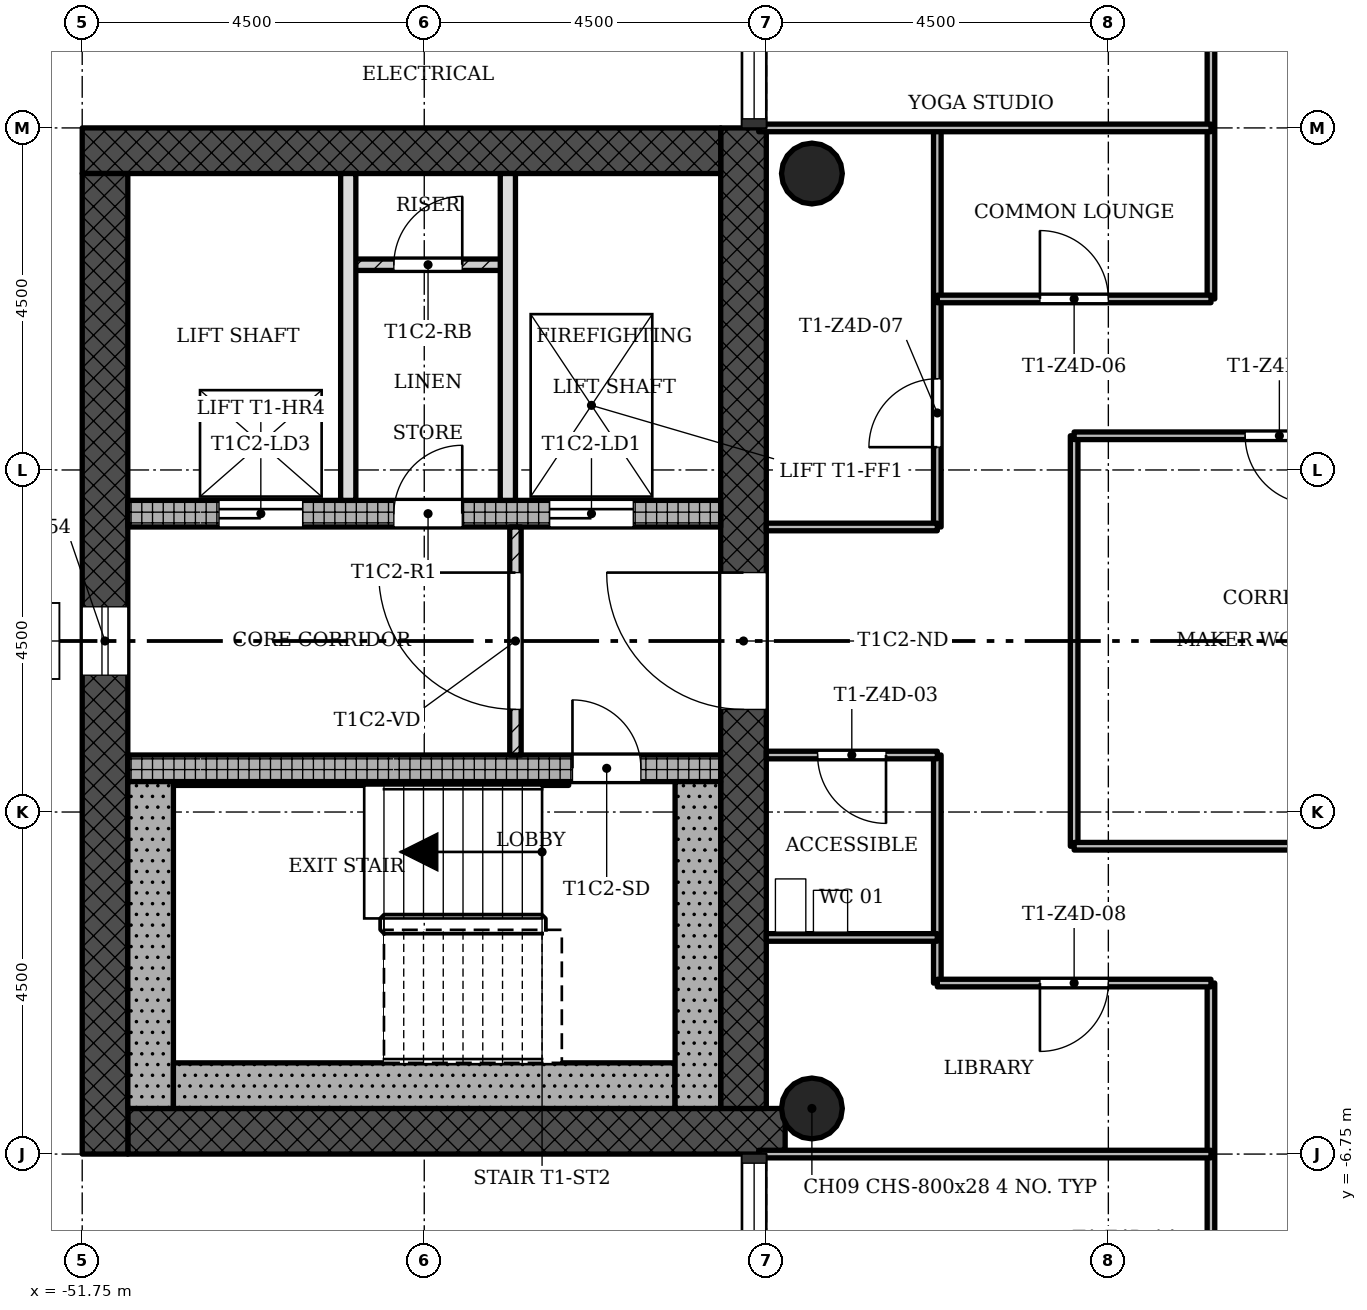
"""IFC4 building model, lengths in metres.
Left out: names, types, materials, properties, quantities, classifications, styles, units other than length and angle.
Written with IfcOpenShell. Run it as: python <this file> out.ifc"""

import sys

from ifc_helpers import new_model, si_unit, direction, frame, frame_2d, origin, origin_2d, place, context, subcontext, project, spatial, rectangle, hollow_circle, extrude, element, fill, save


model = new_model("IFC4")
c1 = context("Model", 3, precision=1e-05, world=origin(), true_north=direction((0.0, 1.0)))
c2 = subcontext(c1, "Body", "Model", "MODEL_VIEW")
j1 = project(units=[si_unit("LENGTHUNIT", "METRE"), si_unit("PLANEANGLEUNIT", "RADIAN")], contexts=[c1])
p1 = place(None, origin())
s1 = spatial("IfcSite", under=j1, at=p1, CompositionType="ELEMENT")
p2 = place(p1, origin())
s2 = spatial("IfcBuilding", under=s1, at=p2, CompositionType="ELEMENT")
p3 = place(p2, frame((0.0, 0.0, 196.0)))
s3 = spatial("IfcBuildingStorey", under=s2, at=p3, CompositionType="ELEMENT", Elevation=196.0)
p4 = place(p3, frame((-51.15, -6.45, 0.0), z_axis=(0.0, 0.0, 1.0), x_axis=(1.0, 0.0, 0.0)))
e1 = element("IfcWall", 1, at=p4, inside=s3, PredefinedType="SHEAR", context=c2, shape_type="SweptSolid", body=[
    extrude(rectangle(XDim=8.648, YDim=0.6, at=frame_2d((4.324, 0.0))), origin(), (0.0, 0.0, 1.0), 3.4),
])
p5 = place(p3, frame((-43.05, -6.15, 0.0), z_axis=(0.0, 0.0, 1.0), x_axis=(0.0, 1.0, 0.0)))
e2 = element("IfcWall", 2, at=p5, inside=s3, PredefinedType="SHEAR", context=c2, shape_type="SweptSolid", body=[
    extrude(rectangle(XDim=12.9, YDim=0.6, at=frame_2d((6.45, 0.0))), origin(), (0.0, 0.0, 1.0), 3.4),
])
p6 = place(p5, frame((5.25, 0.0, 0.0)))
e3 = element("IfcOpeningElement", 3, at=p6, cuts=e2, PredefinedType="OPENING", context=c2, shape_type="SweptSolid", body=[
    extrude(rectangle(XDim=1.8, YDim=2.1, at=frame_2d((0.9, 1.05))), frame((0.0, 0.31, 0.0), z_axis=(0.0, -1.0, 0.0), x_axis=(1.0, 0.0, 0.0)), (0.0, 0.0, 1.0), 0.62),
])
p7 = place(p3, frame((-43.35, 6.45, 0.0), z_axis=(0.0, 0.0, 1.0), x_axis=(-1.0, 0.0, 0.0)))
e4 = element("IfcWall", 4, at=p7, inside=s3, PredefinedType="SHEAR", context=c2, shape_type="SweptSolid", body=[
    extrude(rectangle(XDim=8.4, YDim=0.6, at=frame_2d((4.2, 0.0))), origin(), (0.0, 0.0, 1.0), 3.4),
])
p8 = place(p3, frame((-51.45, 6.15, 0.0), z_axis=(0.0, 0.0, 1.0), x_axis=(0.0, -1.0, 0.0)))
e5 = element("IfcWall", 5, at=p8, inside=s3, PredefinedType="SHEAR", context=c2, shape_type="SweptSolid", body=[
    extrude(rectangle(XDim=12.9, YDim=0.6, at=frame_2d((6.45, 0.0))), origin(), (0.0, 0.0, 1.0), 3.4),
])
p9 = place(p8, frame((5.7, 0.0, 0.45)))
e6 = element("IfcOpeningElement", 6, at=p9, cuts=e5, PredefinedType="OPENING", context=c2, shape_type="SweptSolid", body=[
    extrude(rectangle(XDim=0.9, YDim=2.4, at=frame_2d((0.45, 1.2))), frame((0.0, 0.31, 0.0), z_axis=(0.0, -1.0, 0.0), x_axis=(1.0, 0.0, 0.0)), (0.0, 0.0, 1.0), 0.62),
])
p10 = place(p3, frame((-51.15, -1.675, 0.0), z_axis=(0.0, 0.0, 1.0), x_axis=(1.0, 0.0, 0.0)))
e7 = element("IfcWall", 7, at=p10, inside=s3, PredefinedType="SHEAR", context=c2, shape_type="SweptSolid", body=[
    extrude(rectangle(XDim=7.8, YDim=0.35, at=frame_2d((3.9, 0.0))), origin(), (0.0, 0.0, 1.0), 3.4),
])
p11 = place(p10, frame((5.85, 0.0, 0.0)))
e8 = element("IfcOpeningElement", 8, at=p11, cuts=e7, PredefinedType="OPENING", context=c2, shape_type="SweptSolid", body=[
    extrude(rectangle(XDim=0.9, YDim=2.1, at=frame_2d((0.45, 1.05))), frame((0.0, 0.185, 0.0), z_axis=(0.0, -1.0, 0.0), x_axis=(1.0, 0.0, 0.0)), (0.0, 0.0, 1.0), 0.37),
])
p12 = place(p3, frame((-51.15, 1.675, 0.0), z_axis=(0.0, 0.0, 1.0), x_axis=(1.0, 0.0, 0.0)))
e9 = element("IfcWall", 9, at=p12, inside=s3, PredefinedType="SHEAR", context=c2, shape_type="SweptSolid", body=[
    extrude(rectangle(XDim=7.8, YDim=0.35, at=frame_2d((3.9, 0.0))), origin(), (0.0, 0.0, 1.0), 3.4),
])
p13 = place(p12, frame((5.55, 0.0, 0.0)))
e10 = element("IfcOpeningElement", 10, at=p13, cuts=e9, PredefinedType="OPENING", context=c2, shape_type="SweptSolid", body=[
    extrude(rectangle(XDim=1.1, YDim=2.1, at=frame_2d((0.55, 1.05))), frame((0.0, 0.185, 0.0), z_axis=(0.0, -1.0, 0.0), x_axis=(1.0, 0.0, 0.0)), (0.0, 0.0, 1.0), 0.37),
])
p14 = place(p12, frame((1.2, 0.0, 0.0)))
e11 = element("IfcOpeningElement", 11, at=p14, cuts=e9, PredefinedType="OPENING", context=c2, shape_type="SweptSolid", body=[
    extrude(rectangle(XDim=1.1, YDim=2.1, at=frame_2d((0.55, 1.05))), frame((0.0, 0.185, 0.0), z_axis=(0.0, -1.0, 0.0), x_axis=(1.0, 0.0, 0.0)), (0.0, 0.0, 1.0), 0.37),
])
p15 = place(p12, frame((3.5, 0.0, 0.0)))
e12 = element("IfcOpeningElement", 12, at=p15, cuts=e9, PredefinedType="OPENING", context=c2, shape_type="SweptSolid", body=[
    extrude(rectangle(XDim=0.9, YDim=2.1, at=frame_2d((0.45, 1.05))), frame((0.0, 0.185, 0.0), z_axis=(0.0, -1.0, 0.0), x_axis=(1.0, 0.0, 0.0)), (0.0, 0.0, 1.0), 0.37),
])
for number, where, z_axis, x_axis in (
    (13, (-42.15, -6.15, 0.0), (0.0, 0.0, 1.0), (1.0, 0.0, 0.0)),
    (14, (-42.15, 6.15, 0.0), (0.0, 0.0, 1.0), (1.0, 0.0, 0.0)),
):
    element("IfcColumn", number, at=place(p3, frame(where, z_axis=z_axis, x_axis=x_axis)), inside=s3, PredefinedType="COLUMN", context=c2, shape_type="SweptSolid", body=[
        extrude(hollow_circle(Radius=0.4, WallThickness=0.028, at=origin_2d()), origin(), (0.0, 0.0, 1.0), 3.4),
    ])
p16 = place(p3, frame((-46.05, 1.5, 0.0), z_axis=(0.0, 0.0, 1.0), x_axis=(0.0, -1.0, 0.0)))
e15 = element("IfcWall", 15, at=p16, inside=s3, PredefinedType="PARTITIONING", context=c2, shape_type="SweptSolid", body=[
    extrude(rectangle(XDim=3.0, YDim=0.15, at=frame_2d((1.5, 0.0))), origin(), (0.0, 0.0, 1.0), 3.0),
])
p17 = place(p16, frame((0.6, 0.0, 0.0)))
e16 = element("IfcOpeningElement", 16, at=p17, cuts=e15, PredefinedType="OPENING", context=c2, shape_type="SweptSolid", body=[
    extrude(rectangle(XDim=1.8, YDim=2.1, at=frame_2d((0.9, 1.05))), frame((0.0, 0.085, 0.0), z_axis=(0.0, -1.0, 0.0), x_axis=(1.0, 0.0, 0.0)), (0.0, 0.0, 1.0), 0.17),
])
for number, where, z_axis, x_axis in (
    (17, (-48.25, 6.15, 0.0), (0.0, 0.0, 1.0), (0.0, -1.0, 0.0)),
    (18, (-46.15, 6.15, 0.0), (0.0, 0.0, 1.0), (0.0, -1.0, 0.0)),
):
    element("IfcWall", number, at=place(p3, frame(where, z_axis=z_axis, x_axis=x_axis)), inside=s3, PredefinedType="SOLIDWALL", context=c2, shape_type="SweptSolid", body=[
        extrude(rectangle(XDim=4.3, YDim=0.2, at=frame_2d((2.15, 0.0))), origin(), (0.0, 0.0, 1.0), 3.0),
    ])
p18 = place(p3, frame((-46.15, 4.95, 0.0), z_axis=(0.0, 0.0, 1.0), x_axis=(-1.0, 0.0, 0.0)))
e19 = element("IfcWall", 19, at=p18, inside=s3, PredefinedType="PARTITIONING", context=c2, shape_type="SweptSolid", body=[
    extrude(rectangle(XDim=2.1, YDim=0.15, at=frame_2d((1.05, 0.0))), origin(), (0.0, 0.0, 1.0), 3.0),
])
p19 = place(p18, frame((0.6, 0.0, 0.0)))
e20 = element("IfcOpeningElement", 20, at=p19, cuts=e19, PredefinedType="OPENING", context=c2, shape_type="SweptSolid", body=[
    extrude(rectangle(XDim=0.9, YDim=2.1, at=frame_2d((0.45, 1.05))), frame((0.0, 0.085, 0.0), z_axis=(0.0, -1.0, 0.0), x_axis=(1.0, 0.0, 0.0)), (0.0, 0.0, 1.0), 0.17),
])
p20 = place(p3, frame((-40.5, -4.5, 0.0), z_axis=(0.0, 0.0, 1.0), x_axis=(0.0, 1.0, 0.0)))
e21 = element("IfcWall", 21, at=p20, inside=s3, PredefinedType="PARTITIONING", context=c2, shape_type="SweptSolid", body=[
    extrude(rectangle(XDim=3.0, YDim=0.1, at=frame_2d((1.5, 0.0))), origin(), (0.0, 0.0, 1.0), 3.0),
])
p21 = place(p3, frame((-40.5, 1.5, 0.0), z_axis=(0.0, 0.0, 1.0), x_axis=(0.0, 1.0, 0.0)))
e22 = element("IfcWall", 22, at=p21, inside=s3, PredefinedType="PARTITIONING", context=c2, shape_type="SweptSolid", body=[
    extrude(rectangle(XDim=5.25, YDim=0.1, at=frame_2d((2.625, 0.0))), origin(), (0.0, 0.0, 1.0), 3.0),
])
p22 = place(p21, frame((1.05, 0.0, 0.0)))
e23 = element("IfcOpeningElement", 23, at=p22, cuts=e22, PredefinedType="OPENING", context=c2, shape_type="SweptSolid", body=[
    extrude(rectangle(XDim=0.9, YDim=2.1, at=frame_2d((0.45, 1.05))), frame((0.0, 0.06, 0.0), z_axis=(0.0, -1.0, 0.0), x_axis=(1.0, 0.0, 0.0)), (0.0, 0.0, 1.0), 0.12),
])
p23 = place(p3, frame((-38.7, -2.7, 0.0), z_axis=(0.0, 0.0, 1.0), x_axis=(0.0, 1.0, 0.0)))
e24 = element("IfcWall", 24, at=p23, inside=s3, PredefinedType="PARTITIONING", context=c2, shape_type="SweptSolid", body=[
    extrude(rectangle(XDim=5.4, YDim=0.1, at=frame_2d((2.7, 0.0))), origin(), (0.0, 0.0, 1.0), 3.0),
])
p24 = place(p3, frame((-36.9, -11.25, 0.0), z_axis=(0.0, 0.0, 1.0), x_axis=(0.0, 1.0, 0.0)))
e25 = element("IfcWall", 25, at=p24, inside=s3, PredefinedType="PARTITIONING", context=c2, shape_type="SweptSolid", body=[
    extrude(rectangle(XDim=6.75, YDim=0.1, at=frame_2d((3.375, 0.0))), origin(), (0.0, 0.0, 1.0), 3.0),
])
p25 = place(p24, frame((1.8, 0.0, 0.0)))
e26 = element("IfcOpeningElement", 26, at=p25, cuts=e25, PredefinedType="OPENING", context=c2, shape_type="SweptSolid", body=[
    extrude(rectangle(XDim=0.9, YDim=2.1, at=frame_2d((0.45, 1.05))), frame((0.0, 0.06, 0.0), z_axis=(0.0, -1.0, 0.0), x_axis=(1.0, 0.0, 0.0)), (0.0, 0.0, 1.0), 0.12),
])
p26 = place(p3, frame((-36.9, 4.5, 0.0), z_axis=(0.0, 0.0, 1.0), x_axis=(0.0, 1.0, 0.0)))
e27 = element("IfcWall", 27, at=p26, inside=s3, PredefinedType="PARTITIONING", context=c2, shape_type="SweptSolid", body=[
    extrude(rectangle(XDim=4.05, YDim=0.1, at=frame_2d((2.025, 0.0))), origin(), (0.0, 0.0, 1.0), 3.0),
])
p27 = place(p3, frame((-42.85, -6.75, 0.0), z_axis=(0.0, 0.0, 1.0), x_axis=(1.0, 0.0, 0.0)))
e28 = element("IfcWall", 28, at=p27, inside=s3, PredefinedType="PARTITIONING", context=c2, shape_type="SweptSolid", body=[
    extrude(rectangle(XDim=5.95, YDim=0.1, at=frame_2d((2.975, 0.0))), origin(), (0.0, 0.0, 1.0), 3.0),
])
p28 = place(p3, frame((-40.5, -4.5, 0.0), z_axis=(0.0, 0.0, 1.0), x_axis=(1.0, 0.0, 0.0)))
e29 = element("IfcWall", 29, at=p28, inside=s3, PredefinedType="PARTITIONING", context=c2, shape_type="SweptSolid", body=[
    extrude(rectangle(XDim=3.6, YDim=0.1, at=frame_2d((1.8, 0.0))), origin(), (0.0, 0.0, 1.0), 3.0),
])
p29 = place(p28, frame((1.35, 0.0, 0.0)))
e30 = element("IfcOpeningElement", 30, at=p29, cuts=e29, PredefinedType="OPENING", context=c2, shape_type="SweptSolid", body=[
    extrude(rectangle(XDim=0.9, YDim=2.1, at=frame_2d((0.45, 1.05))), frame((0.0, 0.06, 0.0), z_axis=(0.0, -1.0, 0.0), x_axis=(1.0, 0.0, 0.0)), (0.0, 0.0, 1.0), 0.12),
])
p30 = place(p3, frame((-42.75, -3.9, 0.0), z_axis=(0.0, 0.0, 1.0), x_axis=(1.0, 0.0, 0.0)))
e31 = element("IfcWall", 31, at=p30, inside=s3, PredefinedType="PARTITIONING", context=c2, shape_type="SweptSolid", body=[
    extrude(rectangle(XDim=2.25, YDim=0.1, at=frame_2d((1.125, 0.0))), origin(), (0.0, 0.0, 1.0), 3.0),
])
p31 = place(p3, frame((-38.7, -2.7, 0.0), z_axis=(0.0, 0.0, 1.0), x_axis=(1.0, 0.0, 0.0)))
e32 = element("IfcWall", 32, at=p31, inside=s3, PredefinedType="PARTITIONING", context=c2, shape_type="SweptSolid", body=[
    extrude(rectangle(XDim=5.4, YDim=0.1, at=frame_2d((2.7, 0.0))), origin(), (0.0, 0.0, 1.0), 3.0),
])
p32 = place(p3, frame((-42.75, -1.5, 0.0), z_axis=(0.0, 0.0, 1.0), x_axis=(1.0, 0.0, 0.0)))
e33 = element("IfcWall", 33, at=p32, inside=s3, PredefinedType="PARTITIONING", context=c2, shape_type="SweptSolid", body=[
    extrude(rectangle(XDim=2.25, YDim=0.1, at=frame_2d((1.125, 0.0))), origin(), (0.0, 0.0, 1.0), 3.0),
])
p33 = place(p32, frame((0.675, 0.0, 0.0)))
e34 = element("IfcOpeningElement", 34, at=p33, cuts=e33, PredefinedType="OPENING", context=c2, shape_type="SweptSolid", body=[
    extrude(rectangle(XDim=0.9, YDim=2.1, at=frame_2d((0.45, 1.05))), frame((0.0, 0.06, 0.0), z_axis=(0.0, -1.0, 0.0), x_axis=(1.0, 0.0, 0.0)), (0.0, 0.0, 1.0), 0.12),
])
p34 = place(p3, frame((-42.75, 1.5, 0.0), z_axis=(0.0, 0.0, 1.0), x_axis=(1.0, 0.0, 0.0)))
e35 = element("IfcWall", 35, at=p34, inside=s3, PredefinedType="PARTITIONING", context=c2, shape_type="SweptSolid", body=[
    extrude(rectangle(XDim=2.25, YDim=0.1, at=frame_2d((1.125, 0.0))), origin(), (0.0, 0.0, 1.0), 3.0),
])
p35 = place(p3, frame((-38.7, 2.7, 0.0), z_axis=(0.0, 0.0, 1.0), x_axis=(1.0, 0.0, 0.0)))
e36 = element("IfcWall", 36, at=p35, inside=s3, PredefinedType="PARTITIONING", context=c2, shape_type="SweptSolid", body=[
    extrude(rectangle(XDim=5.4, YDim=0.1, at=frame_2d((2.7, 0.0))), origin(), (0.0, 0.0, 1.0), 3.0),
])
p36 = place(p35, frame((2.25, 0.0, 0.0)))
e37 = element("IfcOpeningElement", 37, at=p36, cuts=e36, PredefinedType="OPENING", context=c2, shape_type="SweptSolid", body=[
    extrude(rectangle(XDim=0.9, YDim=2.1, at=frame_2d((0.45, 1.05))), frame((0.0, 0.06, 0.0), z_axis=(0.0, -1.0, 0.0), x_axis=(1.0, 0.0, 0.0)), (0.0, 0.0, 1.0), 0.12),
])
p37 = place(p3, frame((-40.5, 4.5, 0.0), z_axis=(0.0, 0.0, 1.0), x_axis=(1.0, 0.0, 0.0)))
e38 = element("IfcWall", 38, at=p37, inside=s3, PredefinedType="PARTITIONING", context=c2, shape_type="SweptSolid", body=[
    extrude(rectangle(XDim=3.6, YDim=0.1, at=frame_2d((1.8, 0.0))), origin(), (0.0, 0.0, 1.0), 3.0),
])
p38 = place(p37, frame((1.35, 0.0, 0.0)))
e39 = element("IfcOpeningElement", 39, at=p38, cuts=e38, PredefinedType="OPENING", context=c2, shape_type="SweptSolid", body=[
    extrude(rectangle(XDim=0.9, YDim=2.1, at=frame_2d((0.45, 1.05))), frame((0.0, 0.06, 0.0), z_axis=(0.0, -1.0, 0.0), x_axis=(1.0, 0.0, 0.0)), (0.0, 0.0, 1.0), 0.12),
])
p39 = place(p3, frame((-42.85, 6.75, 0.0), z_axis=(0.0, 0.0, 1.0), x_axis=(1.0, 0.0, 0.0)))
e40 = element("IfcWall", 40, at=p39, inside=s3, PredefinedType="PARTITIONING", context=c2, shape_type="SweptSolid", body=[
    extrude(rectangle(XDim=5.95, YDim=0.1, at=frame_2d((2.975, 0.0))), origin(), (0.0, 0.0, 1.0), 3.0),
])
p40 = place(p3, frame((-50.85, -1.85, 0.0), z_axis=(0.0, 0.0, 1.0), x_axis=(0.0, -1.0, 0.0)))
e41 = element("IfcWall", 41, at=p40, inside=s3, PredefinedType="SHEAR", context=c2, shape_type="SweptSolid", body=[
    extrude(rectangle(XDim=4.3, YDim=0.6, at=frame_2d((2.15, 0.0))), origin(), (0.0, 0.0, 1.0), 3.4),
])
p41 = place(p3, frame((-43.95, -5.85, 0.0), z_axis=(0.0, 0.0, 1.0), x_axis=(-1.0, 0.0, 0.0)))
e42 = element("IfcWall", 42, at=p41, inside=s3, PredefinedType="SHEAR", context=c2, shape_type="SweptSolid", body=[
    extrude(rectangle(XDim=6.6, YDim=0.6, at=frame_2d((3.3, 0.0))), origin(), (0.0, 0.0, 1.0), 3.4),
])
p42 = place(p3, frame((-43.65, -1.85, 0.0), z_axis=(0.0, 0.0, 1.0), x_axis=(0.0, -1.0, 0.0)))
e43 = element("IfcWall", 43, at=p42, inside=s3, PredefinedType="SHEAR", context=c2, shape_type="SweptSolid", body=[
    extrude(rectangle(XDim=4.3, YDim=0.6, at=frame_2d((2.15, 0.0))), origin(), (0.0, 0.0, 1.0), 3.4),
])
p43 = place(p3, frame((-45.35, -1.875, 0.0), z_axis=(0.0, 0.0, 1.0), x_axis=(-1.0, 0.0, 0.0)))
e44 = element("IfcWall", 44, at=p43, inside=s3, PredefinedType="SHEAR", context=c2, shape_type="SweptSolid", body=[
    extrude(rectangle(XDim=5.2, YDim=0.05, at=frame_2d((2.6, 0.0))), origin(), (0.0, 0.0, 1.0), 3.4),
])
p44 = place(p9, origin())
e45 = element("IfcWindow", 45, at=p44, inside=s3, PartitioningType="SINGLE_PANEL", PredefinedType="WINDOW", context=c2, shape_type="SweptSolid", body=[
    extrude(rectangle(XDim=0.9, YDim=2.4, at=frame_2d((0.45, 1.2))), frame((0.0, 0.03, 0.0), z_axis=(0.0, -1.0, 0.0), x_axis=(1.0, 0.0, 0.0)), (0.0, 0.0, 1.0), 0.06),
])
fill(e6, e45)
p45 = place(p17, origin())
e46 = element("IfcDoor", 46, at=p45, inside=s3, OperationType="SINGLE_SWING_LEFT", PredefinedType="DOOR", context=c2, shape_type="SweptSolid", body=[
    extrude(rectangle(XDim=1.8, YDim=2.1, at=frame_2d((0.9, 1.05))), frame((0.0, 0.025, 0.0), z_axis=(0.0, -1.0, 0.0), x_axis=(1.0, 0.0, 0.0)), (0.0, 0.0, 1.0), 0.05),
])
fill(e16, e46)
p46 = place(p19, origin())
e47 = element("IfcDoor", 47, at=p46, inside=s3, OperationType="SINGLE_SWING_LEFT", PredefinedType="DOOR", context=c2, shape_type="SweptSolid", body=[
    extrude(rectangle(XDim=0.9, YDim=2.1, at=frame_2d((0.45, 1.05))), frame((0.0, 0.025, 0.0), z_axis=(0.0, -1.0, 0.0), x_axis=(1.0, 0.0, 0.0)), (0.0, 0.0, 1.0), 0.05),
])
fill(e20, e47)
p47 = place(p36, origin())
e48 = element("IfcDoor", 48, at=p47, inside=s3, OperationType="SINGLE_SWING_RIGHT", PredefinedType="DOOR", context=c2, shape_type="SweptSolid", body=[
    extrude(rectangle(XDim=0.9, YDim=2.1, at=frame_2d((0.45, 1.05))), frame((0.0, 0.025, 0.0), z_axis=(0.0, -1.0, 0.0), x_axis=(1.0, 0.0, 0.0)), (0.0, 0.0, 1.0), 0.05),
])
fill(e37, e48)
p48 = place(p33, origin())
e49 = element("IfcDoor", 49, at=p48, inside=s3, OperationType="SINGLE_SWING_RIGHT", PredefinedType="DOOR", context=c2, shape_type="SweptSolid", body=[
    extrude(rectangle(XDim=0.9, YDim=2.1, at=frame_2d((0.45, 1.05))), frame((0.0, 0.025, 0.0), z_axis=(0.0, -1.0, 0.0), x_axis=(1.0, 0.0, 0.0)), (0.0, 0.0, 1.0), 0.05),
])
fill(e34, e49)
p49 = place(p38, origin())
e50 = element("IfcDoor", 50, at=p49, inside=s3, OperationType="SINGLE_SWING_RIGHT", PredefinedType="DOOR", context=c2, shape_type="SweptSolid", body=[
    extrude(rectangle(XDim=0.9, YDim=2.1, at=frame_2d((0.45, 1.05))), frame((0.0, 0.025, 0.0), z_axis=(0.0, -1.0, 0.0), x_axis=(1.0, 0.0, 0.0)), (0.0, 0.0, 1.0), 0.05),
])
fill(e39, e50)
p50 = place(p22, origin())
e51 = element("IfcDoor", 51, at=p50, inside=s3, OperationType="SINGLE_SWING_RIGHT", PredefinedType="DOOR", context=c2, shape_type="SweptSolid", body=[
    extrude(rectangle(XDim=0.9, YDim=2.1, at=frame_2d((0.45, 1.05))), frame((0.0, 0.025, 0.0), z_axis=(0.0, -1.0, 0.0), x_axis=(1.0, 0.0, 0.0)), (0.0, 0.0, 1.0), 0.05),
])
fill(e23, e51)
p51 = place(p29, origin())
e52 = element("IfcDoor", 52, at=p51, inside=s3, OperationType="SINGLE_SWING_LEFT", PredefinedType="DOOR", context=c2, shape_type="SweptSolid", body=[
    extrude(rectangle(XDim=0.9, YDim=2.1, at=frame_2d((0.45, 1.05))), frame((0.0, 0.025, 0.0), z_axis=(0.0, -1.0, 0.0), x_axis=(1.0, 0.0, 0.0)), (0.0, 0.0, 1.0), 0.05),
])
fill(e30, e52)
p52 = place(p11, origin())
e53 = element("IfcDoor", 53, at=p52, inside=s3, OperationType="SINGLE_SWING_RIGHT", PredefinedType="DOOR", context=c2, shape_type="SweptSolid", body=[
    extrude(rectangle(XDim=0.9, YDim=2.1, at=frame_2d((0.45, 1.05))), frame((0.0, 0.025, 0.0), z_axis=(0.0, -1.0, 0.0), x_axis=(1.0, 0.0, 0.0)), (0.0, 0.0, 1.0), 0.05),
])
fill(e8, e53)
p53 = place(p13, origin())
e54 = element("IfcDoor", 54, at=p53, inside=s3, OperationType="SLIDING_TO_LEFT", PredefinedType="DOOR", context=c2, shape_type="SweptSolid", body=[
    extrude(rectangle(XDim=1.1, YDim=2.1, at=frame_2d((0.55, 1.05))), frame((0.0, 0.025, 0.0), z_axis=(0.0, -1.0, 0.0), x_axis=(1.0, 0.0, 0.0)), (0.0, 0.0, 1.0), 0.05),
])
fill(e10, e54)
p54 = place(p14, origin())
e55 = element("IfcDoor", 55, at=p54, inside=s3, OperationType="SLIDING_TO_LEFT", PredefinedType="DOOR", context=c2, shape_type="SweptSolid", body=[
    extrude(rectangle(XDim=1.1, YDim=2.1, at=frame_2d((0.55, 1.05))), frame((0.0, 0.025, 0.0), z_axis=(0.0, -1.0, 0.0), x_axis=(1.0, 0.0, 0.0)), (0.0, 0.0, 1.0), 0.05),
])
fill(e11, e55)
p55 = place(p15, origin())
e56 = element("IfcDoor", 56, at=p55, inside=s3, OperationType="SINGLE_SWING_LEFT", PredefinedType="DOOR", context=c2, shape_type="SweptSolid", body=[
    extrude(rectangle(XDim=0.9, YDim=2.1, at=frame_2d((0.45, 1.05))), frame((0.0, 0.025, 0.0), z_axis=(0.0, -1.0, 0.0), x_axis=(1.0, 0.0, 0.0)), (0.0, 0.0, 1.0), 0.05),
])
fill(e12, e56)
p56 = place(p6, origin())
e57 = element("IfcDoor", 57, at=p56, inside=s3, OperationType="SINGLE_SWING_LEFT", PredefinedType="DOOR", context=c2, shape_type="SweptSolid", body=[
    extrude(rectangle(XDim=1.8, YDim=2.1, at=frame_2d((0.9, 1.05))), frame((0.0, 0.025, 0.0), z_axis=(0.0, -1.0, 0.0), x_axis=(1.0, 0.0, 0.0)), (0.0, 0.0, 1.0), 0.05),
])
fill(e3, e57)
save(model, sys.argv[1])
